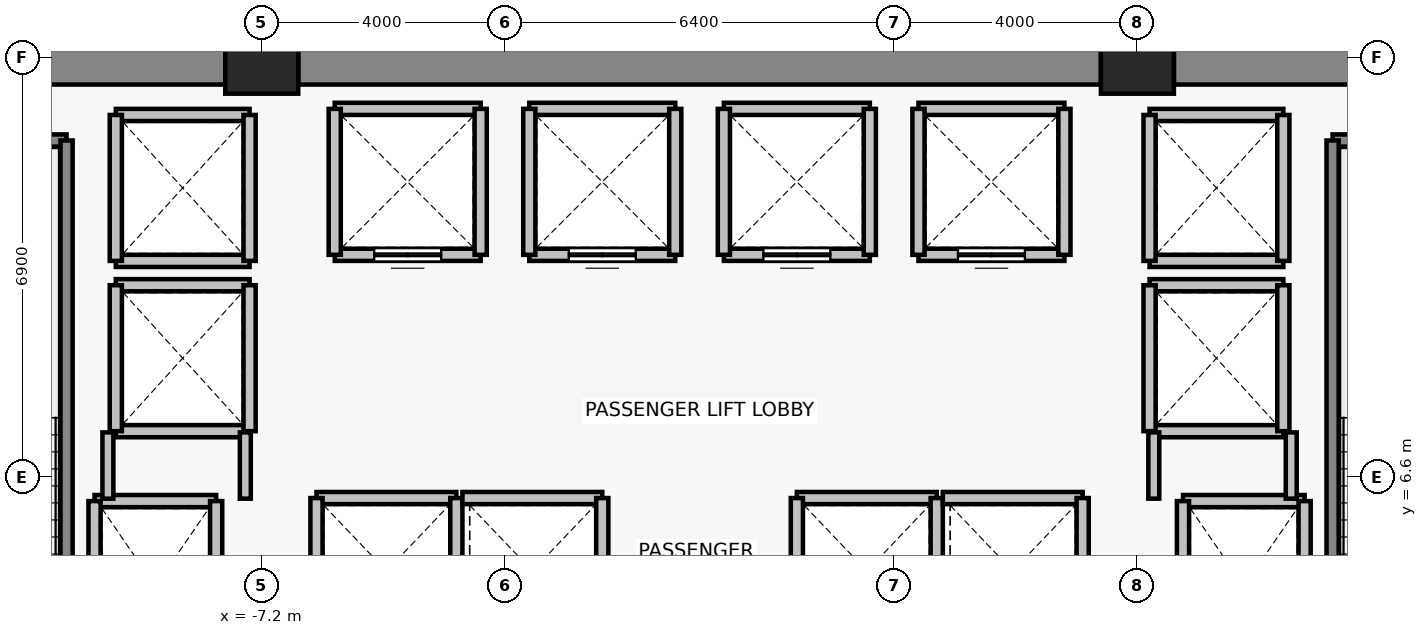
"""IFC4 building model, lengths in metres.
Left out: names, types, materials, properties, quantities, classifications, styles, units other than length and angle.
Written with IfcOpenShell. Run it as: python <this file> out.ifc"""

import sys

from ifc_helpers import new_model, si_unit, direction, frame, frame_2d, origin, origin_2d, place, context, subcontext, project, spatial, rectangle, extrude, source, transform, mapped, element, fill, save


model = new_model("IFC4")
c1 = context("Model", 3, precision=1e-05, world=origin(), true_north=direction((0.0, 1.0)))
c2 = subcontext(c1, "Body", "Model", "MODEL_VIEW")
j1 = project(units=[si_unit("LENGTHUNIT", "METRE"), si_unit("PLANEANGLEUNIT", "RADIAN")], contexts=[c1])
p1 = place(None, origin())
s1 = spatial("IfcSite", under=j1, at=p1, CompositionType="ELEMENT")
p2 = place(p1, origin())
s2 = spatial("IfcBuilding", under=s1, at=p2, CompositionType="ELEMENT")
p3 = place(p2, frame((0.0, 0.0, 34.0)))
s3 = spatial("IfcBuildingStorey", under=s2, at=p3, CompositionType="ELEMENT", Elevation=34.0)
for number, where, z_axis, x_axis in (
    (1, (-7.2, 13.5, 0.0), (0.0, 0.0, 1.0), (1.0, 0.0, 0.0)),
    (2, (7.2, 13.5, 0.0), (0.0, 0.0, 1.0), (1.0, 0.0, 0.0)),
):
    element("IfcColumn", number, at=place(p3, frame(where, z_axis=z_axis, x_axis=x_axis)), inside=s3, PredefinedType="COLUMN", context=c2, shape_type="SweptSolid", body=[
        extrude(rectangle(XDim=1.2, YDim=1.2, at=origin_2d()), origin(), (0.0, 0.0, 1.0), 3.3),
    ])
p4 = place(p3, frame((-13.8, 13.5, 0.0), z_axis=(0.0, 0.0, 1.0), x_axis=(1.0, 0.0, 0.0)))
e3 = element("IfcWall", 3, at=p4, inside=s3, PredefinedType="SHEAR", context=c2, shape_type="SweptSolid", body=[
    extrude(rectangle(XDim=6.0, YDim=0.9, at=frame_2d((3.0, 0.0))), origin(), (0.0, 0.0, 1.0), 3.075),
])
p5 = place(p3, frame((-6.6, 13.5, 0.0), z_axis=(0.0, 0.0, 1.0), x_axis=(1.0, 0.0, 0.0)))
e4 = element("IfcWall", 4, at=p5, inside=s3, PredefinedType="SHEAR", context=c2, shape_type="SweptSolid", body=[
    extrude(rectangle(XDim=13.2, YDim=0.9, at=frame_2d((6.6, 0.0))), origin(), (0.0, 0.0, 1.0), 3.075),
])
p6 = place(p3, frame((7.8, 13.5, 0.0), z_axis=(0.0, 0.0, 1.0), x_axis=(1.0, 0.0, 0.0)))
e5 = element("IfcWall", 5, at=p6, inside=s3, PredefinedType="SHEAR", context=c2, shape_type="SweptSolid", body=[
    extrude(rectangle(XDim=6.0, YDim=0.9, at=frame_2d((3.0, 0.0))), origin(), (0.0, 0.0, 1.0), 3.075),
])
p7 = place(p3, frame((-9.95, 6.2, 0.0), z_axis=(0.0, 0.0, 1.0), x_axis=(1.0, 0.0, 0.0)))
e6 = element("IfcWall", 6, at=p7, inside=s3, PredefinedType="SOLIDWALL", context=c2, shape_type="SweptSolid", body=[
    extrude(rectangle(XDim=2.0, YDim=0.2, at=frame_2d((1.0, 0.0))), origin(), (0.0, 0.0, 1.0), 3.075),
])
for number, where, z_axis, x_axis in (
    (7, (-9.95, 3.4, 0.0), (0.0, 0.0, 1.0), (0.0, 1.0, 0.0)),
    (8, (-7.95, 6.2, 0.0), (0.0, 0.0, 1.0), (0.0, -1.0, 0.0)),
):
    element("IfcWall", number, at=place(p3, frame(where, z_axis=z_axis, x_axis=x_axis)), inside=s3, PredefinedType="SOLIDWALL", context=c2, shape_type="SweptSolid", body=[
        extrude(rectangle(XDim=2.8, YDim=0.2, at=frame_2d((1.4, 0.0))), origin(), (0.0, 0.0, 1.0), 3.075),
    ])
p8 = place(p3, frame((7.95, 6.2, 0.0), z_axis=(0.0, 0.0, 1.0), x_axis=(1.0, 0.0, 0.0)))
e9 = element("IfcWall", 9, at=p8, inside=s3, PredefinedType="SOLIDWALL", context=c2, shape_type="SweptSolid", body=[
    extrude(rectangle(XDim=2.0, YDim=0.2, at=frame_2d((1.0, 0.0))), origin(), (0.0, 0.0, 1.0), 3.075),
])
for number, where, z_axis, x_axis in (
    (10, (7.95, 3.4, 0.0), (0.0, 0.0, 1.0), (0.0, 1.0, 0.0)),
    (11, (9.95, 6.2, 0.0), (0.0, 0.0, 1.0), (0.0, -1.0, 0.0)),
):
    element("IfcWall", number, at=place(p3, frame(where, z_axis=z_axis, x_axis=x_axis)), inside=s3, PredefinedType="SOLIDWALL", context=c2, shape_type="SweptSolid", body=[
        extrude(rectangle(XDim=2.8, YDim=0.2, at=frame_2d((1.4, 0.0))), origin(), (0.0, 0.0, 1.0), 3.075),
    ])
p9 = place(p3, frame((-3.6, 10.25, 0.0), z_axis=(0.0, 0.0, 1.0), x_axis=(-1.0, 0.0, 0.0)))
e12 = element("IfcWall", 12, at=p9, inside=s3, PredefinedType="SOLIDWALL", context=c2, shape_type="SweptSolid", body=[
    extrude(rectangle(XDim=2.4, YDim=0.2, at=frame_2d((1.2, 0.0))), origin(), (0.0, 0.0, 1.0), 3.075),
])
p10 = place(p9, frame((0.65, 0.0, 0.0)))
e13 = element("IfcOpeningElement", 13, at=p10, cuts=e12, PredefinedType="OPENING", context=c2, shape_type="SweptSolid", body=[
    extrude(rectangle(XDim=1.1, YDim=2.2, at=frame_2d((0.55, 1.1))), frame((0.0, 0.11, 0.0), z_axis=(0.0, -1.0, 0.0), x_axis=(1.0, 0.0, 0.0)), (0.0, 0.0, 1.0), 0.22),
])
for number, where, z_axis, x_axis in (
    (14, (-6.0, 12.65, 0.0), (0.0, 0.0, 1.0), (1.0, 0.0, 0.0)),
    (15, (-6.0, 10.25, 0.0), (0.0, 0.0, 1.0), (0.0, 1.0, 0.0)),
    (16, (-3.6, 12.65, 0.0), (0.0, 0.0, 1.0), (0.0, -1.0, 0.0)),
):
    element("IfcWall", number, at=place(p3, frame(where, z_axis=z_axis, x_axis=x_axis)), inside=s3, PredefinedType="SOLIDWALL", context=c2, shape_type="SweptSolid", body=[
        extrude(rectangle(XDim=2.4, YDim=0.2, at=frame_2d((1.2, 0.0))), origin(), (0.0, 0.0, 1.0), 3.075),
    ])
p11 = place(p3, frame((-0.4, 10.25, 0.0), z_axis=(0.0, 0.0, 1.0), x_axis=(-1.0, 0.0, 0.0)))
e17 = element("IfcWall", 17, at=p11, inside=s3, PredefinedType="SOLIDWALL", context=c2, shape_type="SweptSolid", body=[
    extrude(rectangle(XDim=2.4, YDim=0.2, at=frame_2d((1.2, 0.0))), origin(), (0.0, 0.0, 1.0), 3.075),
])
p12 = place(p11, frame((0.65, 0.0, 0.0)))
e18 = element("IfcOpeningElement", 18, at=p12, cuts=e17, PredefinedType="OPENING", context=c2, shape_type="SweptSolid", body=[
    extrude(rectangle(XDim=1.1, YDim=2.2, at=frame_2d((0.55, 1.1))), frame((0.0, 0.11, 0.0), z_axis=(0.0, -1.0, 0.0), x_axis=(1.0, 0.0, 0.0)), (0.0, 0.0, 1.0), 0.22),
])
p13 = place(p3, frame((-2.8, 12.65, 0.0), z_axis=(0.0, 0.0, 1.0), x_axis=(1.0, 0.0, 0.0)))
e19 = element("IfcWall", 19, at=p13, inside=s3, PredefinedType="SOLIDWALL", context=c2, shape_type="SweptSolid", body=[
    extrude(rectangle(XDim=2.4, YDim=0.2, at=frame_2d((1.2, 0.0))), origin(), (0.0, 0.0, 1.0), 3.075),
])
for number, where, z_axis, x_axis in (
    (20, (-2.8, 10.25, 0.0), (0.0, 0.0, 1.0), (0.0, 1.0, 0.0)),
    (21, (-0.4, 12.65, 0.0), (0.0, 0.0, 1.0), (0.0, -1.0, 0.0)),
):
    element("IfcWall", number, at=place(p3, frame(where, z_axis=z_axis, x_axis=x_axis)), inside=s3, PredefinedType="SOLIDWALL", context=c2, shape_type="SweptSolid", body=[
        extrude(rectangle(XDim=2.4, YDim=0.2, at=frame_2d((1.2, 0.0))), origin(), (0.0, 0.0, 1.0), 3.075),
    ])
p14 = place(p3, frame((2.8, 10.25, 0.0), z_axis=(0.0, 0.0, 1.0), x_axis=(-1.0, 0.0, 0.0)))
e22 = element("IfcWall", 22, at=p14, inside=s3, PredefinedType="SOLIDWALL", context=c2, shape_type="SweptSolid", body=[
    extrude(rectangle(XDim=2.4, YDim=0.2, at=frame_2d((1.2, 0.0))), origin(), (0.0, 0.0, 1.0), 3.075),
])
p15 = place(p14, frame((0.65, 0.0, 0.0)))
e23 = element("IfcOpeningElement", 23, at=p15, cuts=e22, PredefinedType="OPENING", context=c2, shape_type="SweptSolid", body=[
    extrude(rectangle(XDim=1.1, YDim=2.2, at=frame_2d((0.55, 1.1))), frame((0.0, 0.11, 0.0), z_axis=(0.0, -1.0, 0.0), x_axis=(1.0, 0.0, 0.0)), (0.0, 0.0, 1.0), 0.22),
])
p16 = place(p3, frame((0.4, 12.65, 0.0), z_axis=(0.0, 0.0, 1.0), x_axis=(1.0, 0.0, 0.0)))
e24 = element("IfcWall", 24, at=p16, inside=s3, PredefinedType="SOLIDWALL", context=c2, shape_type="SweptSolid", body=[
    extrude(rectangle(XDim=2.4, YDim=0.2, at=frame_2d((1.2, 0.0))), origin(), (0.0, 0.0, 1.0), 3.075),
])
for number, where, z_axis, x_axis in (
    (25, (0.4, 10.25, 0.0), (0.0, 0.0, 1.0), (0.0, 1.0, 0.0)),
    (26, (2.8, 12.65, 0.0), (0.0, 0.0, 1.0), (0.0, -1.0, 0.0)),
):
    element("IfcWall", number, at=place(p3, frame(where, z_axis=z_axis, x_axis=x_axis)), inside=s3, PredefinedType="SOLIDWALL", context=c2, shape_type="SweptSolid", body=[
        extrude(rectangle(XDim=2.4, YDim=0.2, at=frame_2d((1.2, 0.0))), origin(), (0.0, 0.0, 1.0), 3.075),
    ])
p17 = place(p3, frame((6.0, 10.25, 0.0), z_axis=(0.0, 0.0, 1.0), x_axis=(-1.0, 0.0, 0.0)))
e27 = element("IfcWall", 27, at=p17, inside=s3, PredefinedType="SOLIDWALL", context=c2, shape_type="SweptSolid", body=[
    extrude(rectangle(XDim=2.4, YDim=0.2, at=frame_2d((1.2, 0.0))), origin(), (0.0, 0.0, 1.0), 3.075),
])
p18 = place(p17, frame((0.65, 0.0, 0.0)))
e28 = element("IfcOpeningElement", 28, at=p18, cuts=e27, PredefinedType="OPENING", context=c2, shape_type="SweptSolid", body=[
    extrude(rectangle(XDim=1.1, YDim=2.2, at=frame_2d((0.55, 1.1))), frame((0.0, 0.11, 0.0), z_axis=(0.0, -1.0, 0.0), x_axis=(1.0, 0.0, 0.0)), (0.0, 0.0, 1.0), 0.22),
])
for number, where, z_axis, x_axis in (
    (29, (3.6, 12.65, 0.0), (0.0, 0.0, 1.0), (1.0, 0.0, 0.0)),
    (30, (3.6, 10.25, 0.0), (0.0, 0.0, 1.0), (0.0, 1.0, 0.0)),
    (31, (6.0, 12.65, 0.0), (0.0, 0.0, 1.0), (0.0, -1.0, 0.0)),
):
    element("IfcWall", number, at=place(p3, frame(where, z_axis=z_axis, x_axis=x_axis)), inside=s3, PredefinedType="SOLIDWALL", context=c2, shape_type="SweptSolid", body=[
        extrude(rectangle(XDim=2.4, YDim=0.2, at=frame_2d((1.2, 0.0))), origin(), (0.0, 0.0, 1.0), 3.075),
    ])
p19 = place(p3, frame((-6.3, 6.25, 0.0), z_axis=(0.0, 0.0, 1.0), x_axis=(1.0, 0.0, 0.0)))
e32 = element("IfcWall", 32, at=p19, inside=s3, PredefinedType="SOLIDWALL", context=c2, shape_type="SweptSolid", body=[
    extrude(rectangle(XDim=2.3, YDim=0.2, at=frame_2d((1.15, 0.0))), origin(), (0.0, 0.0, 1.0), 3.075),
])
for number, where, z_axis, x_axis in (
    (33, (-6.3, 3.85, 0.0), (0.0, 0.0, 1.0), (0.0, 1.0, 0.0)),
    (34, (-4.0, 6.25, 0.0), (0.0, 0.0, 1.0), (0.0, -1.0, 0.0)),
):
    element("IfcWall", number, at=place(p3, frame(where, z_axis=z_axis, x_axis=x_axis)), inside=s3, PredefinedType="SOLIDWALL", context=c2, shape_type="SweptSolid", body=[
        extrude(rectangle(XDim=2.4, YDim=0.2, at=frame_2d((1.2, 0.0))), origin(), (0.0, 0.0, 1.0), 3.075),
    ])
p20 = place(p3, frame((-3.9, 6.25, 0.0), z_axis=(0.0, 0.0, 1.0), x_axis=(1.0, 0.0, 0.0)))
e35 = element("IfcWall", 35, at=p20, inside=s3, PredefinedType="SOLIDWALL", context=c2, shape_type="SweptSolid", body=[
    extrude(rectangle(XDim=2.3, YDim=0.2, at=frame_2d((1.15, 0.0))), origin(), (0.0, 0.0, 1.0), 3.075),
])
p21 = place(p3, frame((-1.6, 6.25, 0.0), z_axis=(0.0, 0.0, 1.0), x_axis=(0.0, -1.0, 0.0)))
e36 = element("IfcWall", 36, at=p21, inside=s3, PredefinedType="SOLIDWALL", context=c2, shape_type="SweptSolid", body=[
    extrude(rectangle(XDim=2.4, YDim=0.2, at=frame_2d((1.2, 0.0))), origin(), (0.0, 0.0, 1.0), 3.075),
])
p22 = place(p3, frame((1.6, 6.25, 0.0), z_axis=(0.0, 0.0, 1.0), x_axis=(1.0, 0.0, 0.0)))
e37 = element("IfcWall", 37, at=p22, inside=s3, PredefinedType="SOLIDWALL", context=c2, shape_type="SweptSolid", body=[
    extrude(rectangle(XDim=2.3, YDim=0.2, at=frame_2d((1.15, 0.0))), origin(), (0.0, 0.0, 1.0), 3.075),
])
for number, where, z_axis, x_axis in (
    (38, (1.6, 3.85, 0.0), (0.0, 0.0, 1.0), (0.0, 1.0, 0.0)),
    (39, (3.9, 6.25, 0.0), (0.0, 0.0, 1.0), (0.0, -1.0, 0.0)),
):
    element("IfcWall", number, at=place(p3, frame(where, z_axis=z_axis, x_axis=x_axis)), inside=s3, PredefinedType="SOLIDWALL", context=c2, shape_type="SweptSolid", body=[
        extrude(rectangle(XDim=2.4, YDim=0.2, at=frame_2d((1.2, 0.0))), origin(), (0.0, 0.0, 1.0), 3.075),
    ])
p23 = place(p3, frame((4.0, 6.25, 0.0), z_axis=(0.0, 0.0, 1.0), x_axis=(1.0, 0.0, 0.0)))
e40 = element("IfcWall", 40, at=p23, inside=s3, PredefinedType="SOLIDWALL", context=c2, shape_type="SweptSolid", body=[
    extrude(rectangle(XDim=2.3, YDim=0.2, at=frame_2d((1.15, 0.0))), origin(), (0.0, 0.0, 1.0), 3.075),
])
p24 = place(p3, frame((6.3, 6.25, 0.0), z_axis=(0.0, 0.0, 1.0), x_axis=(0.0, -1.0, 0.0)))
e41 = element("IfcWall", 41, at=p24, inside=s3, PredefinedType="SOLIDWALL", context=c2, shape_type="SweptSolid", body=[
    extrude(rectangle(XDim=2.4, YDim=0.2, at=frame_2d((1.2, 0.0))), origin(), (0.0, 0.0, 1.0), 3.075),
])
for number, where, z_axis, x_axis in (
    (42, (-7.4, 7.35, 0.0), (0.0, 0.0, 1.0), (-1.0, 0.0, 0.0)),
    (43, (-9.6, 9.75, 0.0), (0.0, 0.0, 1.0), (1.0, 0.0, 0.0)),
):
    element("IfcWall", number, at=place(p3, frame(where, z_axis=z_axis, x_axis=x_axis)), inside=s3, PredefinedType="SOLIDWALL", context=c2, shape_type="SweptSolid", body=[
        extrude(rectangle(XDim=2.2, YDim=0.2, at=frame_2d((1.1, 0.0))), origin(), (0.0, 0.0, 1.0), 2.465),
    ])
p25 = place(p3, frame((-9.6, 7.35, 0.0), z_axis=(0.0, 0.0, 1.0), x_axis=(0.0, 1.0, 0.0)))
e44 = element("IfcWall", 44, at=p25, inside=s3, PredefinedType="SOLIDWALL", context=c2, shape_type="SweptSolid", body=[
    extrude(rectangle(XDim=2.4, YDim=0.2, at=frame_2d((1.2, 0.0))), origin(), (0.0, 0.0, 1.0), 3.075),
])
p26 = place(p3, frame((-7.4, 9.75, 0.0), z_axis=(0.0, 0.0, 1.0), x_axis=(0.0, -1.0, 0.0)))
e45 = element("IfcWall", 45, at=p26, inside=s3, PredefinedType="SOLIDWALL", context=c2, shape_type="SweptSolid", body=[
    extrude(rectangle(XDim=2.4, YDim=0.2, at=frame_2d((1.2, 0.0))), origin(), (0.0, 0.0, 1.0), 2.465),
])
for number, where, z_axis, x_axis in (
    (46, (-7.4, 10.15, 0.0), (0.0, 0.0, 1.0), (-1.0, 0.0, 0.0)),
    (47, (-9.6, 12.55, 0.0), (0.0, 0.0, 1.0), (1.0, 0.0, 0.0)),
):
    element("IfcWall", number, at=place(p3, frame(where, z_axis=z_axis, x_axis=x_axis)), inside=s3, PredefinedType="SOLIDWALL", context=c2, shape_type="SweptSolid", body=[
        extrude(rectangle(XDim=2.2, YDim=0.2, at=frame_2d((1.1, 0.0))), origin(), (0.0, 0.0, 1.0), 2.465),
    ])
p27 = place(p3, frame((-9.6, 10.15, 0.0), z_axis=(0.0, 0.0, 1.0), x_axis=(0.0, 1.0, 0.0)))
e48 = element("IfcWall", 48, at=p27, inside=s3, PredefinedType="SOLIDWALL", context=c2, shape_type="SweptSolid", body=[
    extrude(rectangle(XDim=2.4, YDim=0.2, at=frame_2d((1.2, 0.0))), origin(), (0.0, 0.0, 1.0), 3.075),
])
p28 = place(p3, frame((-7.4, 12.55, 0.0), z_axis=(0.0, 0.0, 1.0), x_axis=(0.0, -1.0, 0.0)))
e49 = element("IfcWall", 49, at=p28, inside=s3, PredefinedType="SOLIDWALL", context=c2, shape_type="SweptSolid", body=[
    extrude(rectangle(XDim=2.4, YDim=0.2, at=frame_2d((1.2, 0.0))), origin(), (0.0, 0.0, 1.0), 2.465),
])
for number, where, z_axis, x_axis in (
    (50, (9.6, 7.35, 0.0), (0.0, 0.0, 1.0), (-1.0, 0.0, 0.0)),
    (51, (7.4, 9.75, 0.0), (0.0, 0.0, 1.0), (1.0, 0.0, 0.0)),
):
    element("IfcWall", number, at=place(p3, frame(where, z_axis=z_axis, x_axis=x_axis)), inside=s3, PredefinedType="SOLIDWALL", context=c2, shape_type="SweptSolid", body=[
        extrude(rectangle(XDim=2.2, YDim=0.2, at=frame_2d((1.1, 0.0))), origin(), (0.0, 0.0, 1.0), 2.465),
    ])
p29 = place(p3, frame((7.4, 7.35, 0.0), z_axis=(0.0, 0.0, 1.0), x_axis=(0.0, 1.0, 0.0)))
e52 = element("IfcWall", 52, at=p29, inside=s3, PredefinedType="SOLIDWALL", context=c2, shape_type="SweptSolid", body=[
    extrude(rectangle(XDim=2.4, YDim=0.2, at=frame_2d((1.2, 0.0))), origin(), (0.0, 0.0, 1.0), 2.465),
])
p30 = place(p3, frame((9.6, 9.75, 0.0), z_axis=(0.0, 0.0, 1.0), x_axis=(0.0, -1.0, 0.0)))
e53 = element("IfcWall", 53, at=p30, inside=s3, PredefinedType="SOLIDWALL", context=c2, shape_type="SweptSolid", body=[
    extrude(rectangle(XDim=2.4, YDim=0.2, at=frame_2d((1.2, 0.0))), origin(), (0.0, 0.0, 1.0), 3.075),
])
for number, where, z_axis, x_axis in (
    (54, (9.6, 10.15, 0.0), (0.0, 0.0, 1.0), (-1.0, 0.0, 0.0)),
    (55, (7.4, 12.55, 0.0), (0.0, 0.0, 1.0), (1.0, 0.0, 0.0)),
):
    element("IfcWall", number, at=place(p3, frame(where, z_axis=z_axis, x_axis=x_axis)), inside=s3, PredefinedType="SOLIDWALL", context=c2, shape_type="SweptSolid", body=[
        extrude(rectangle(XDim=2.2, YDim=0.2, at=frame_2d((1.1, 0.0))), origin(), (0.0, 0.0, 1.0), 2.465),
    ])
p31 = place(p3, frame((7.4, 10.15, 0.0), z_axis=(0.0, 0.0, 1.0), x_axis=(0.0, 1.0, 0.0)))
e56 = element("IfcWall", 56, at=p31, inside=s3, PredefinedType="SOLIDWALL", context=c2, shape_type="SweptSolid", body=[
    extrude(rectangle(XDim=2.4, YDim=0.2, at=frame_2d((1.2, 0.0))), origin(), (0.0, 0.0, 1.0), 2.465),
])
p32 = place(p3, frame((9.6, 12.55, 0.0), z_axis=(0.0, 0.0, 1.0), x_axis=(0.0, -1.0, 0.0)))
e57 = element("IfcWall", 57, at=p32, inside=s3, PredefinedType="SOLIDWALL", context=c2, shape_type="SweptSolid", body=[
    extrude(rectangle(XDim=2.4, YDim=0.2, at=frame_2d((1.2, 0.0))), origin(), (0.0, 0.0, 1.0), 3.075),
])
p33 = place(p3, frame((-13.93, 12.13, 0.0), z_axis=(0.0, 0.0, 1.0), x_axis=(1.0, 0.0, 0.0)))
e58 = element("IfcWall", 58, at=p33, inside=s3, PredefinedType="SOLIDWALL", context=c2, shape_type="SweptSolid", body=[
    extrude(rectangle(XDim=3.52, YDim=0.2, at=frame_2d((1.76, 0.0))), origin(), (0.0, 0.0, 1.0), 3.075),
])
p34 = place(p3, frame((-10.41, 12.13, 0.0), z_axis=(0.0, 0.0, 1.0), x_axis=(0.0, -1.0, 0.0)))
e59 = element("IfcWall", 59, at=p34, inside=s3, PredefinedType="SOLIDWALL", context=c2, shape_type="SweptSolid", body=[
    extrude(rectangle(XDim=8.84, YDim=0.2, at=frame_2d((4.42, 0.0))), origin(), (0.0, 0.0, 1.0), 3.075),
])
p35 = place(p3, frame((10.41, 12.13, 0.0), z_axis=(0.0, 0.0, 1.0), x_axis=(1.0, 0.0, 0.0)))
e60 = element("IfcWall", 60, at=p35, inside=s3, PredefinedType="SOLIDWALL", context=c2, shape_type="SweptSolid", body=[
    extrude(rectangle(XDim=3.52, YDim=0.2, at=frame_2d((1.76, 0.0))), origin(), (0.0, 0.0, 1.0), 3.075),
])
p36 = place(p3, frame((10.41, 3.29, 0.0), z_axis=(0.0, 0.0, 1.0), x_axis=(0.0, 1.0, 0.0)))
e61 = element("IfcWall", 61, at=p36, inside=s3, PredefinedType="SOLIDWALL", context=c2, shape_type="SweptSolid", body=[
    extrude(rectangle(XDim=8.84, YDim=0.2, at=frame_2d((4.42, 0.0))), origin(), (0.0, 0.0, 1.0), 3.075),
])
p37 = place(p3, frame((-9.73, 6.24, 0.0), z_axis=(0.0, 0.0, 1.0), x_axis=(0.0, 1.0, 0.0)))
e62 = element("IfcWall", 62, at=p37, inside=s3, PredefinedType="PARTITIONING", context=c2, shape_type="SweptSolid", body=[
    extrude(rectangle(XDim=1.09, YDim=0.18, at=frame_2d((0.545, 0.0))), origin(), (0.0, 0.0, 1.0), 3.075),
])
for number, where, z_axis, x_axis in (
    (63, (-7.47, 7.33, 0.0), (0.0, 0.0, 1.0), (0.0, -1.0, 0.0)),
    (64, (7.47, 6.24, 0.0), (0.0, 0.0, 1.0), (0.0, 1.0, 0.0)),
):
    element("IfcWall", number, at=place(p3, frame(where, z_axis=z_axis, x_axis=x_axis)), inside=s3, PredefinedType="PARTITIONING", context=c2, shape_type="SweptSolid", body=[
        extrude(rectangle(XDim=1.09, YDim=0.18, at=frame_2d((0.545, 0.0))), origin(), (0.0, 0.0, 1.0), 2.465),
    ])
p38 = place(p3, frame((9.73, 7.33, 0.0), z_axis=(0.0, 0.0, 1.0), x_axis=(0.0, -1.0, 0.0)))
e65 = element("IfcWall", 65, at=p38, inside=s3, PredefinedType="PARTITIONING", context=c2, shape_type="SweptSolid", body=[
    extrude(rectangle(XDim=1.09, YDim=0.18, at=frame_2d((0.545, 0.0))), origin(), (0.0, 0.0, 1.0), 3.075),
])
m1 = source(origin(), c2, "Body", "SweptSolid", [
    extrude(rectangle(XDim=1.1, YDim=2.2, at=frame_2d((0.55, 1.1))), frame((0.0, 0.025, 0.0), z_axis=(0.0, -1.0, 0.0), x_axis=(1.0, 0.0, 0.0)), (0.0, 0.0, 1.0), 0.05),
])
p39 = place(p10, origin())
e66 = element("IfcDoor", 66, at=p39, inside=s3, OperationType="DOUBLE_DOOR_SLIDING", PredefinedType="DOOR", context=c2, shape_type="MappedRepresentation", body=[
    mapped(m1, transform((0.0, 0.0, 0.0), x_axis=(1.0, 0.0, 0.0), y_axis=(0.0, 1.0, 0.0), z_axis=(0.0, 0.0, 1.0), scale=1.0)),
])
fill(e13, e66)
p40 = place(p12, origin())
e67 = element("IfcDoor", 67, at=p40, inside=s3, OperationType="DOUBLE_DOOR_SLIDING", PredefinedType="DOOR", context=c2, shape_type="MappedRepresentation", body=[
    mapped(m1, transform((0.0, 0.0, 0.0), x_axis=(1.0, 0.0, 0.0), y_axis=(0.0, 1.0, 0.0), z_axis=(0.0, 0.0, 1.0), scale=1.0)),
])
fill(e18, e67)
p41 = place(p15, origin())
e68 = element("IfcDoor", 68, at=p41, inside=s3, OperationType="DOUBLE_DOOR_SLIDING", PredefinedType="DOOR", context=c2, shape_type="MappedRepresentation", body=[
    mapped(m1, transform((0.0, 0.0, 0.0), x_axis=(1.0, 0.0, 0.0), y_axis=(0.0, 1.0, 0.0), z_axis=(0.0, 0.0, 1.0), scale=1.0)),
])
fill(e23, e68)
p42 = place(p18, origin())
e69 = element("IfcDoor", 69, at=p42, inside=s3, OperationType="DOUBLE_DOOR_SLIDING", PredefinedType="DOOR", context=c2, shape_type="MappedRepresentation", body=[
    mapped(m1, transform((0.0, 0.0, 0.0), x_axis=(1.0, 0.0, 0.0), y_axis=(0.0, 1.0, 0.0), z_axis=(0.0, 0.0, 1.0), scale=1.0)),
])
fill(e28, e69)
save(model, sys.argv[1])
